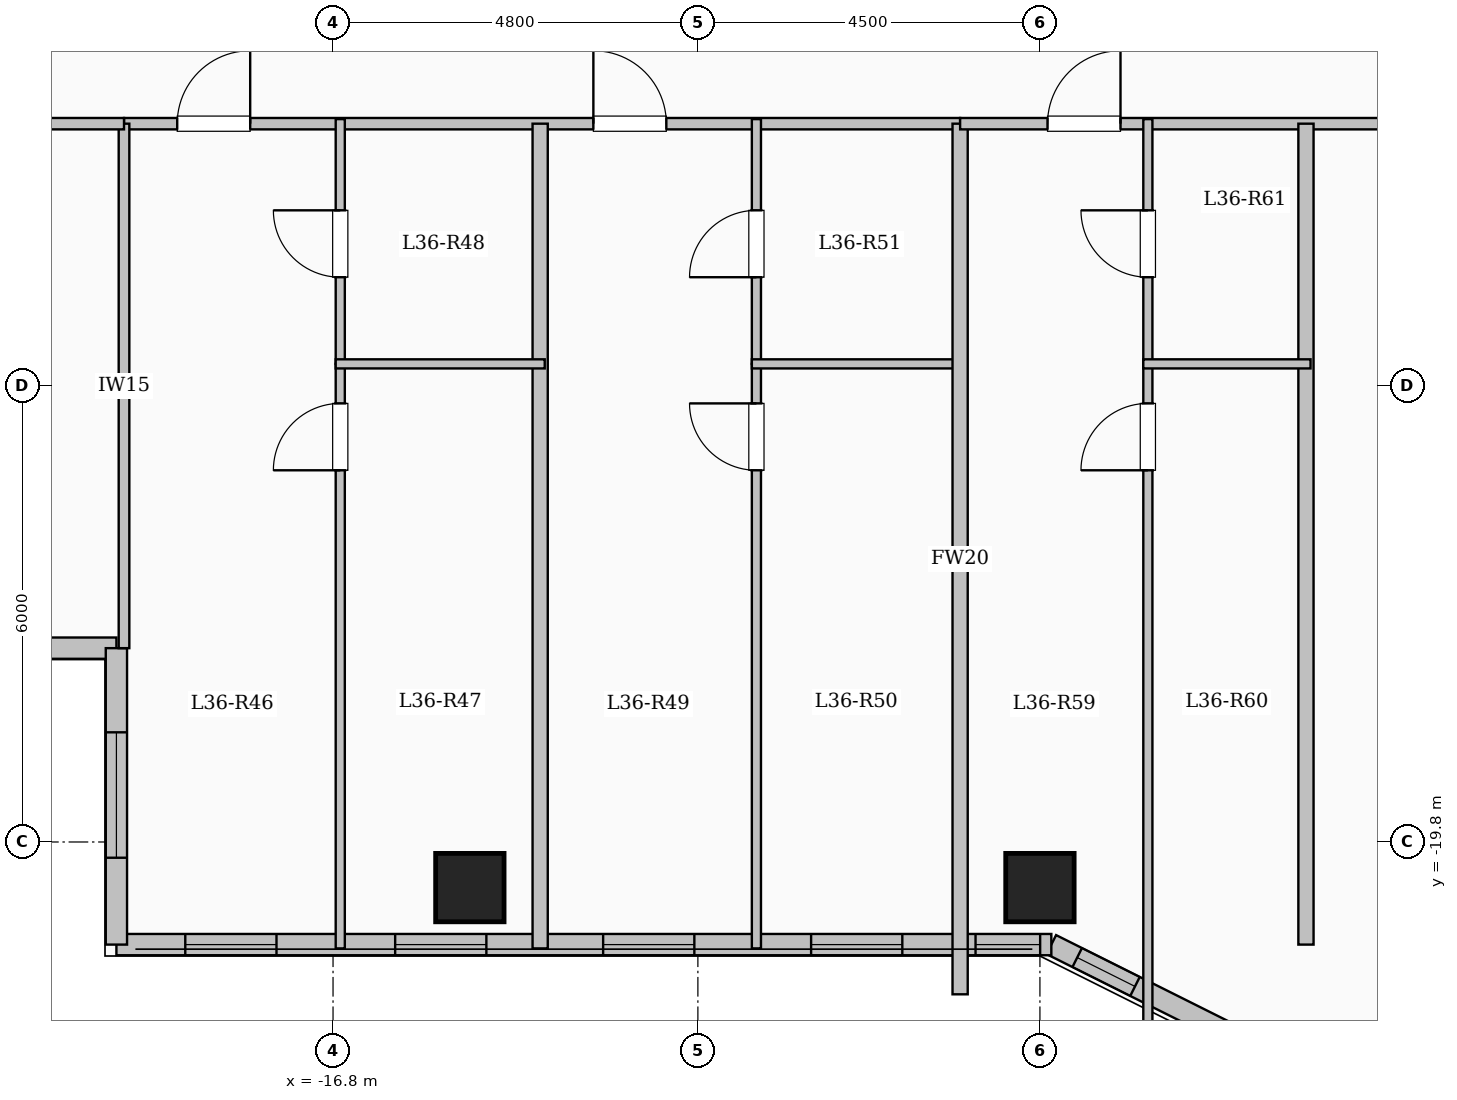
"""IFC4 building model, lengths in metres.
Left out: names, types, materials, properties, quantities, classifications, styles, units other than length and angle.
Written with IfcOpenShell. Run it as: python <this file> out.ifc"""

import sys

from ifc_helpers import new_model, si_unit, direction, frame, frame_2d, origin, origin_2d, place, context, subcontext, project, spatial, rectangle, extrude, element, fill, save


model = new_model("IFC4")
c1 = context("Model", 3, precision=1e-05, world=origin(), true_north=direction((0.0, 1.0)))
c2 = subcontext(c1, "Body", "Model", "MODEL_VIEW")
j1 = project(units=[si_unit("LENGTHUNIT", "METRE"), si_unit("PLANEANGLEUNIT", "RADIAN")], contexts=[c1])
p1 = place(None, origin())
s1 = spatial("IfcSite", under=j1, at=p1, CompositionType="ELEMENT")
p2 = place(p1, origin())
s2 = spatial("IfcBuilding", under=s1, at=p2, CompositionType="ELEMENT")
p3 = place(p2, frame((0.0, 0.0, 135.95)))
s3 = spatial("IfcBuildingStorey", under=s2, at=p3, CompositionType="ELEMENT", Elevation=135.95)
for number, where, z_axis, x_axis in (
    (1, (-15.0, -20.4, 0.0), (0.0, 0.0, 1.0), (1.0, 0.0, 0.0)),
    (2, (-7.5, -20.4, 0.0), (0.0, 0.0, 1.0), (1.0, 0.0, 0.0)),
):
    element("IfcColumn", number, at=place(p3, frame(where, z_axis=z_axis, x_axis=x_axis)), inside=s3, PredefinedType="COLUMN", context=c2, shape_type="SweptSolid", body=[
        extrude(rectangle(XDim=0.9, YDim=0.9, at=origin_2d()), origin(), (0.0, 0.0, 1.0), 3.35),
    ])
p4 = place(p3, frame((-19.65, -17.25, 0.0), z_axis=(0.0, 0.0, 1.0), x_axis=(-1.0, 0.0, 0.0)))
e3 = element("IfcWall", 3, at=p4, inside=s3, PredefinedType="SOLIDWALL", context=c2, shape_type="SweptSolid", body=[
    extrude(rectangle(XDim=5.4, YDim=0.28, at=frame_2d((2.7, 0.0))), origin(), (0.0, 0.0, 1.0), 3.1),
])
p5 = place(p4, frame((1.575, 0.0, 0.9)))
e4 = element("IfcOpeningElement", 4, at=p5, cuts=e3, PredefinedType="OPENING", context=c2, shape_type="SweptSolid", body=[
    extrude(rectangle(XDim=2.2, YDim=1.75, at=frame_2d((1.1, 0.875))), frame((0.0, 0.15, 0.0), z_axis=(0.0, -1.0, 0.0), x_axis=(1.0, 0.0, 0.0)), (0.0, 0.0, 1.0), 0.3),
])
p6 = place(p3, frame((-4.35, -22.65, 0.0), z_axis=(0.0, 0.0, 1.0), x_axis=(-0.894427191, 0.4472135955, 0.0)))
e5 = element("IfcWall", 5, at=p6, inside=s3, PredefinedType="SOLIDWALL", context=c2, shape_type="SweptSolid", body=[
    extrude(rectangle(XDim=3.354, YDim=0.28, at=frame_2d((1.677, 0.0))), origin(), (0.0, 0.0, 1.0), 3.1),
])
p7 = place(p6, frame((2.124, 0.0, 0.95)))
e6 = element("IfcOpeningElement", 6, at=p7, cuts=e5, PredefinedType="OPENING", context=c2, shape_type="SweptSolid", body=[
    extrude(rectangle(XDim=0.85, YDim=1.5, at=frame_2d((0.425, 0.75))), frame((0.0, 0.15, 0.0), z_axis=(0.0, -1.0, 0.0), x_axis=(1.0, 0.0, 0.0)), (0.0, 0.0, 1.0), 0.3),
])
p8 = place(p3, frame((-7.35, -21.15, 0.0), z_axis=(0.0, 0.0, 1.0), x_axis=(-1.0, 0.0, 0.0)))
e7 = element("IfcWall", 7, at=p8, inside=s3, PredefinedType="SOLIDWALL", context=c2, shape_type="SweptSolid", body=[
    extrude(rectangle(XDim=12.3, YDim=0.28, at=frame_2d((6.15, 0.0))), origin(), (0.0, 0.0, 1.0), 3.1),
])
p9 = place(p8, frame((0.147, 0.0, 0.95)))
e8 = element("IfcOpeningElement", 8, at=p9, cuts=e7, PredefinedType="OPENING", context=c2, shape_type="SweptSolid", body=[
    extrude(rectangle(XDim=0.85, YDim=1.5, at=frame_2d((0.425, 0.75))), frame((0.0, 0.15, 0.0), z_axis=(0.0, -1.0, 0.0), x_axis=(1.0, 0.0, 0.0)), (0.0, 0.0, 1.0), 0.3),
])
p10 = place(p8, frame((1.96, 0.0, 0.95)))
e9 = element("IfcOpeningElement", 9, at=p10, cuts=e7, PredefinedType="OPENING", context=c2, shape_type="SweptSolid", body=[
    extrude(rectangle(XDim=1.2, YDim=1.5, at=frame_2d((0.6, 0.75))), frame((0.0, 0.15, 0.0), z_axis=(0.0, -1.0, 0.0), x_axis=(1.0, 0.0, 0.0)), (0.0, 0.0, 1.0), 0.3),
])
p11 = place(p8, frame((4.697, 0.0, 0.95)))
e10 = element("IfcOpeningElement", 10, at=p11, cuts=e7, PredefinedType="OPENING", context=c2, shape_type="SweptSolid", body=[
    extrude(rectangle(XDim=1.2, YDim=1.5, at=frame_2d((0.6, 0.75))), frame((0.0, 0.15, 0.0), z_axis=(0.0, -1.0, 0.0), x_axis=(1.0, 0.0, 0.0)), (0.0, 0.0, 1.0), 0.3),
])
p12 = place(p8, frame((7.433, 0.0, 0.95)))
e11 = element("IfcOpeningElement", 11, at=p12, cuts=e7, PredefinedType="OPENING", context=c2, shape_type="SweptSolid", body=[
    extrude(rectangle(XDim=1.2, YDim=1.5, at=frame_2d((0.6, 0.75))), frame((0.0, 0.15, 0.0), z_axis=(0.0, -1.0, 0.0), x_axis=(1.0, 0.0, 0.0)), (0.0, 0.0, 1.0), 0.3),
])
p13 = place(p8, frame((10.194, 0.0, 0.95)))
e12 = element("IfcOpeningElement", 12, at=p13, cuts=e7, PredefinedType="OPENING", context=c2, shape_type="SweptSolid", body=[
    extrude(rectangle(XDim=1.2, YDim=1.5, at=frame_2d((0.6, 0.75))), frame((0.0, 0.15, 0.0), z_axis=(0.0, -1.0, 0.0), x_axis=(1.0, 0.0, 0.0)), (0.0, 0.0, 1.0), 0.3),
])
p14 = place(p3, frame((-19.65, -21.15, 0.0), z_axis=(0.0, 0.0, 1.0), x_axis=(0.0, 1.0, 0.0)))
e13 = element("IfcWall", 13, at=p14, inside=s3, PredefinedType="SOLIDWALL", context=c2, shape_type="SweptSolid", body=[
    extrude(rectangle(XDim=3.9, YDim=0.28, at=frame_2d((1.95, 0.0))), origin(), (0.0, 0.0, 1.0), 3.1),
])
p15 = place(p14, frame((1.143, 0.0, 0.9)))
e14 = element("IfcOpeningElement", 14, at=p15, cuts=e13, PredefinedType="OPENING", context=c2, shape_type="SweptSolid", body=[
    extrude(rectangle(XDim=1.65, YDim=1.6, at=frame_2d((0.825, 0.8))), frame((0.0, 0.15, 0.0), z_axis=(0.0, -1.0, 0.0), x_axis=(1.0, 0.0, 0.0)), (0.0, 0.0, 1.0), 0.3),
])
p16 = place(p3, frame((-19.55, -10.35, 0.0), z_axis=(0.0, 0.0, 1.0), x_axis=(1.0, 0.0, 0.0)))
e15 = element("IfcWall", 15, at=p16, inside=s3, PredefinedType="PARTITIONING", context=c2, shape_type="SweptSolid", body=[
    extrude(rectangle(XDim=11.0, YDim=0.15, at=frame_2d((5.5, 0.0))), origin(), (0.0, 0.0, 1.0), 3.1),
])
p17 = place(p16, frame((0.7, 0.0, 0.0)))
e16 = element("IfcOpeningElement", 16, at=p17, cuts=e15, PredefinedType="OPENING", context=c2, shape_type="SweptSolid", body=[
    extrude(rectangle(XDim=0.96, YDim=2.15, at=frame_2d((0.48, 1.075))), frame((0.0, 0.085, 0.0), z_axis=(0.0, -1.0, 0.0), x_axis=(1.0, 0.0, 0.0)), (0.0, 0.0, 1.0), 0.17),
])
p18 = place(p16, frame((6.175, 0.0, 0.0)))
e17 = element("IfcOpeningElement", 17, at=p18, cuts=e15, PredefinedType="OPENING", context=c2, shape_type="SweptSolid", body=[
    extrude(rectangle(XDim=0.96, YDim=2.15, at=frame_2d((0.48, 1.075))), frame((0.0, 0.085, 0.0), z_axis=(0.0, -1.0, 0.0), x_axis=(1.0, 0.0, 0.0)), (0.0, 0.0, 1.0), 0.17),
])
p19 = place(p3, frame((-14.075, -21.2, 0.0), z_axis=(0.0, 0.0, 1.0), x_axis=(0.0, 1.0, 0.0)))
e18 = element("IfcWall", 18, at=p19, inside=s3, PredefinedType="SOLIDWALL", context=c2, shape_type="SweptSolid", body=[
    extrude(rectangle(XDim=10.85, YDim=0.2, at=frame_2d((5.425, 0.0))), origin(), (0.0, 0.0, 1.0), 3.1),
])
p20 = place(p3, frame((-16.705, -21.2, 0.0), z_axis=(0.0, 0.0, 1.0), x_axis=(0.0, 1.0, 0.0)))
e19 = element("IfcWall", 19, at=p20, inside=s3, PredefinedType="PARTITIONING", context=c2, shape_type="SweptSolid", body=[
    extrude(rectangle(XDim=7.69, YDim=0.12, at=frame_2d((3.845, 0.0))), origin(), (0.0, 0.0, 1.0), 3.1),
])
p21 = place(p20, frame((6.29, 0.0, 0.0)))
e20 = element("IfcOpeningElement", 20, at=p21, cuts=e19, PredefinedType="OPENING", context=c2, shape_type="SweptSolid", body=[
    extrude(rectangle(XDim=0.88, YDim=2.1, at=frame_2d((0.44, 1.05))), frame((0.0, 0.07, 0.0), z_axis=(0.0, -1.0, 0.0), x_axis=(1.0, 0.0, 0.0)), (0.0, 0.0, 1.0), 0.14),
])
p22 = place(p3, frame((-16.705, -13.51, 0.0), z_axis=(0.0, 0.0, 1.0), x_axis=(0.0, 1.0, 0.0)))
e21 = element("IfcWall", 21, at=p22, inside=s3, PredefinedType="PARTITIONING", context=c2, shape_type="SweptSolid", body=[
    extrude(rectangle(XDim=3.22, YDim=0.12, at=frame_2d((1.61, 0.0))), origin(), (0.0, 0.0, 1.0), 3.1),
])
p23 = place(p22, frame((1.14, 0.0, 0.0)))
e22 = element("IfcOpeningElement", 22, at=p23, cuts=e21, PredefinedType="OPENING", context=c2, shape_type="SweptSolid", body=[
    extrude(rectangle(XDim=0.88, YDim=2.1, at=frame_2d((0.44, 1.05))), frame((0.0, 0.07, 0.0), z_axis=(0.0, -1.0, 0.0), x_axis=(1.0, 0.0, 0.0)), (0.0, 0.0, 1.0), 0.14),
])
p24 = place(p3, frame((-16.765, -13.51, 0.0), z_axis=(0.0, 0.0, 1.0), x_axis=(1.0, 0.0, 0.0)))
e23 = element("IfcWall", 23, at=p24, inside=s3, PredefinedType="PARTITIONING", context=c2, shape_type="SweptSolid", body=[
    extrude(rectangle(XDim=2.75, YDim=0.12, at=frame_2d((1.375, 0.0))), origin(), (0.0, 0.0, 1.0), 3.1),
])
p25 = place(p3, frame((-11.23, -21.2, 0.0), z_axis=(0.0, 0.0, 1.0), x_axis=(0.0, 1.0, 0.0)))
e24 = element("IfcWall", 24, at=p25, inside=s3, PredefinedType="PARTITIONING", context=c2, shape_type="SweptSolid", body=[
    extrude(rectangle(XDim=7.69, YDim=0.12, at=frame_2d((3.845, 0.0))), origin(), (0.0, 0.0, 1.0), 3.1),
])
p26 = place(p25, frame((6.29, 0.0, 0.0)))
e25 = element("IfcOpeningElement", 25, at=p26, cuts=e24, PredefinedType="OPENING", context=c2, shape_type="SweptSolid", body=[
    extrude(rectangle(XDim=0.88, YDim=2.1, at=frame_2d((0.44, 1.05))), frame((0.0, 0.07, 0.0), z_axis=(0.0, -1.0, 0.0), x_axis=(1.0, 0.0, 0.0)), (0.0, 0.0, 1.0), 0.14),
])
p27 = place(p3, frame((-11.23, -13.51, 0.0), z_axis=(0.0, 0.0, 1.0), x_axis=(0.0, 1.0, 0.0)))
e26 = element("IfcWall", 26, at=p27, inside=s3, PredefinedType="PARTITIONING", context=c2, shape_type="SweptSolid", body=[
    extrude(rectangle(XDim=3.22, YDim=0.12, at=frame_2d((1.61, 0.0))), origin(), (0.0, 0.0, 1.0), 3.1),
])
p28 = place(p27, frame((1.14, 0.0, 0.0)))
e27 = element("IfcOpeningElement", 27, at=p28, cuts=e26, PredefinedType="OPENING", context=c2, shape_type="SweptSolid", body=[
    extrude(rectangle(XDim=0.88, YDim=2.1, at=frame_2d((0.44, 1.05))), frame((0.0, 0.07, 0.0), z_axis=(0.0, -1.0, 0.0), x_axis=(1.0, 0.0, 0.0)), (0.0, 0.0, 1.0), 0.14),
])
p29 = place(p3, frame((-11.29, -13.51, 0.0), z_axis=(0.0, 0.0, 1.0), x_axis=(1.0, 0.0, 0.0)))
e28 = element("IfcWall", 28, at=p29, inside=s3, PredefinedType="PARTITIONING", context=c2, shape_type="SweptSolid", body=[
    extrude(rectangle(XDim=2.75, YDim=0.12, at=frame_2d((1.375, 0.0))), origin(), (0.0, 0.0, 1.0), 3.1),
])
p30 = place(p3, frame((-8.55, -21.804, 0.0), z_axis=(0.0, 0.0, 1.0), x_axis=(0.0, 1.0, 0.0)))
e29 = element("IfcWall", 29, at=p30, inside=s3, PredefinedType="SOLIDWALL", context=c2, shape_type="SweptSolid", body=[
    extrude(rectangle(XDim=11.454, YDim=0.2, at=frame_2d((5.727, 0.0))), origin(), (0.0, 0.0, 1.0), 3.1),
])
p31 = place(p3, frame((-8.55, -10.35, 0.0), z_axis=(0.0, 0.0, 1.0), x_axis=(1.0, 0.0, 0.0)))
e30 = element("IfcWall", 30, at=p31, inside=s3, PredefinedType="PARTITIONING", context=c2, shape_type="SweptSolid", body=[
    extrude(rectangle(XDim=17.1, YDim=0.15, at=frame_2d((8.55, 0.0))), origin(), (0.0, 0.0, 1.0), 3.1),
])
p32 = place(p31, frame((1.15, 0.0, 0.0)))
e31 = element("IfcOpeningElement", 31, at=p32, cuts=e30, PredefinedType="OPENING", context=c2, shape_type="SweptSolid", body=[
    extrude(rectangle(XDim=0.96, YDim=2.15, at=frame_2d((0.48, 1.075))), frame((0.0, 0.085, 0.0), z_axis=(0.0, -1.0, 0.0), x_axis=(1.0, 0.0, 0.0)), (0.0, 0.0, 1.0), 0.17),
])
p33 = place(p31, frame((10.5, 0.0, 0.0)))
e32 = element("IfcOpeningElement", 32, at=p33, cuts=e30, PredefinedType="OPENING", context=c2, shape_type="SweptSolid", body=[
    extrude(rectangle(XDim=0.96, YDim=2.15, at=frame_2d((0.48, 1.075))), frame((0.0, 0.085, 0.0), z_axis=(0.0, -1.0, 0.0), x_axis=(1.0, 0.0, 0.0)), (0.0, 0.0, 1.0), 0.17),
])
p34 = place(p3, frame((-4.0, -21.15, 0.0), z_axis=(0.0, 0.0, 1.0), x_axis=(0.0, 1.0, 0.0)))
e33 = element("IfcWall", 33, at=p34, inside=s3, PredefinedType="SOLIDWALL", context=c2, shape_type="SweptSolid", body=[
    extrude(rectangle(XDim=10.8, YDim=0.2, at=frame_2d((5.4, 0.0))), origin(), (0.0, 0.0, 1.0), 3.1),
])
p35 = place(p3, frame((-6.08, -22.414, 0.0), z_axis=(0.0, 0.0, 1.0), x_axis=(0.0, 1.0, 0.0)))
e34 = element("IfcWall", 34, at=p35, inside=s3, PredefinedType="PARTITIONING", context=c2, shape_type="SweptSolid", body=[
    extrude(rectangle(XDim=8.904, YDim=0.12, at=frame_2d((4.452, 0.0))), origin(), (0.0, 0.0, 1.0), 3.1),
])
p36 = place(p35, frame((7.504, 0.0, 0.0)))
e35 = element("IfcOpeningElement", 35, at=p36, cuts=e34, PredefinedType="OPENING", context=c2, shape_type="SweptSolid", body=[
    extrude(rectangle(XDim=0.88, YDim=2.1, at=frame_2d((0.44, 1.05))), frame((0.0, 0.07, 0.0), z_axis=(0.0, -1.0, 0.0), x_axis=(1.0, 0.0, 0.0)), (0.0, 0.0, 1.0), 0.14),
])
p37 = place(p3, frame((-6.08, -13.51, 0.0), z_axis=(0.0, 0.0, 1.0), x_axis=(0.0, 1.0, 0.0)))
e36 = element("IfcWall", 36, at=p37, inside=s3, PredefinedType="PARTITIONING", context=c2, shape_type="SweptSolid", body=[
    extrude(rectangle(XDim=3.22, YDim=0.12, at=frame_2d((1.61, 0.0))), origin(), (0.0, 0.0, 1.0), 3.1),
])
p38 = place(p37, frame((1.14, 0.0, 0.0)))
e37 = element("IfcOpeningElement", 37, at=p38, cuts=e36, PredefinedType="OPENING", context=c2, shape_type="SweptSolid", body=[
    extrude(rectangle(XDim=0.88, YDim=2.1, at=frame_2d((0.44, 1.05))), frame((0.0, 0.07, 0.0), z_axis=(0.0, -1.0, 0.0), x_axis=(1.0, 0.0, 0.0)), (0.0, 0.0, 1.0), 0.14),
])
p39 = place(p3, frame((-6.14, -13.51, 0.0), z_axis=(0.0, 0.0, 1.0), x_axis=(1.0, 0.0, 0.0)))
e38 = element("IfcWall", 38, at=p39, inside=s3, PredefinedType="PARTITIONING", context=c2, shape_type="SweptSolid", body=[
    extrude(rectangle(XDim=2.2, YDim=0.12, at=frame_2d((1.1, 0.0))), origin(), (0.0, 0.0, 1.0), 3.1),
])
p40 = place(p3, frame((-19.55, -17.25, 0.0), z_axis=(0.0, 0.0, 1.0), x_axis=(0.0, 1.0, 0.0)))
e39 = element("IfcWall", 39, at=p40, inside=s3, PredefinedType="PARTITIONING", context=c2, shape_type="SweptSolid", body=[
    extrude(rectangle(XDim=6.9, YDim=0.14, at=frame_2d((3.45, 0.0))), origin(), (0.0, 0.0, 1.0), 3.1),
])
p41 = place(p3, frame((-25.08, -10.35, 0.0), z_axis=(0.0, 0.0, 1.0), x_axis=(1.0, 0.0, 0.0)))
e40 = element("IfcWall", 40, at=p41, inside=s3, PredefinedType="PARTITIONING", context=c2, shape_type="SweptSolid", body=[
    extrude(rectangle(XDim=5.53, YDim=0.15, at=frame_2d((2.765, 0.0))), origin(), (0.0, 0.0, 1.0), 3.1),
])
p42 = place(p41, frame((2.29, 0.0, 0.0)))
e41 = element("IfcOpeningElement", 41, at=p42, cuts=e40, PredefinedType="OPENING", context=c2, shape_type="SweptSolid", body=[
    extrude(rectangle(XDim=0.95, YDim=2.15, at=frame_2d((0.475, 1.075))), frame((0.0, 0.085, 0.0), z_axis=(0.0, -1.0, 0.0), x_axis=(1.0, 0.0, 0.0)), (0.0, 0.0, 1.0), 0.17),
])
p43 = place(p7, origin())
e42 = element("IfcWindow", 42, at=p43, inside=s3, PartitioningType="SINGLE_PANEL", PredefinedType="WINDOW", context=c2, shape_type="SweptSolid", body=[
    extrude(rectangle(XDim=0.85, YDim=1.5, at=frame_2d((0.425, 0.75))), frame((0.0, 0.03, 0.0), z_axis=(0.0, -1.0, 0.0), x_axis=(1.0, 0.0, 0.0)), (0.0, 0.0, 1.0), 0.06),
])
fill(e6, e42)
p44 = place(p9, origin())
e43 = element("IfcWindow", 43, at=p44, inside=s3, PartitioningType="SINGLE_PANEL", PredefinedType="WINDOW", context=c2, shape_type="SweptSolid", body=[
    extrude(rectangle(XDim=0.85, YDim=1.5, at=frame_2d((0.425, 0.75))), frame((0.0, 0.03, 0.0), z_axis=(0.0, -1.0, 0.0), x_axis=(1.0, 0.0, 0.0)), (0.0, 0.0, 1.0), 0.06),
])
fill(e8, e43)
p45 = place(p10, origin())
e44 = element("IfcWindow", 44, at=p45, inside=s3, PartitioningType="SINGLE_PANEL", PredefinedType="WINDOW", context=c2, shape_type="SweptSolid", body=[
    extrude(rectangle(XDim=1.2, YDim=1.5, at=frame_2d((0.6, 0.75))), frame((0.0, 0.03, 0.0), z_axis=(0.0, -1.0, 0.0), x_axis=(1.0, 0.0, 0.0)), (0.0, 0.0, 1.0), 0.06),
])
fill(e9, e44)
p46 = place(p11, origin())
e45 = element("IfcWindow", 45, at=p46, inside=s3, PartitioningType="SINGLE_PANEL", PredefinedType="WINDOW", context=c2, shape_type="SweptSolid", body=[
    extrude(rectangle(XDim=1.2, YDim=1.5, at=frame_2d((0.6, 0.75))), frame((0.0, 0.03, 0.0), z_axis=(0.0, -1.0, 0.0), x_axis=(1.0, 0.0, 0.0)), (0.0, 0.0, 1.0), 0.06),
])
fill(e10, e45)
p47 = place(p12, origin())
e46 = element("IfcWindow", 46, at=p47, inside=s3, PartitioningType="SINGLE_PANEL", PredefinedType="WINDOW", context=c2, shape_type="SweptSolid", body=[
    extrude(rectangle(XDim=1.2, YDim=1.5, at=frame_2d((0.6, 0.75))), frame((0.0, 0.03, 0.0), z_axis=(0.0, -1.0, 0.0), x_axis=(1.0, 0.0, 0.0)), (0.0, 0.0, 1.0), 0.06),
])
fill(e11, e46)
p48 = place(p13, origin())
e47 = element("IfcWindow", 47, at=p48, inside=s3, PartitioningType="SINGLE_PANEL", PredefinedType="WINDOW", context=c2, shape_type="SweptSolid", body=[
    extrude(rectangle(XDim=1.2, YDim=1.5, at=frame_2d((0.6, 0.75))), frame((0.0, 0.03, 0.0), z_axis=(0.0, -1.0, 0.0), x_axis=(1.0, 0.0, 0.0)), (0.0, 0.0, 1.0), 0.06),
])
fill(e12, e47)
p49 = place(p15, origin())
e48 = element("IfcWindow", 48, at=p49, inside=s3, PartitioningType="SINGLE_PANEL", PredefinedType="WINDOW", context=c2, shape_type="SweptSolid", body=[
    extrude(rectangle(XDim=1.65, YDim=1.6, at=frame_2d((0.825, 0.8))), frame((0.0, 0.03, 0.0), z_axis=(0.0, -1.0, 0.0), x_axis=(1.0, 0.0, 0.0)), (0.0, 0.0, 1.0), 0.06),
])
fill(e14, e48)
p50 = place(p17, origin())
e49 = element("IfcDoor", 49, at=p50, inside=s3, OperationType="SINGLE_SWING_RIGHT", PredefinedType="DOOR", context=c2, shape_type="SweptSolid", body=[
    extrude(rectangle(XDim=0.96, YDim=2.15, at=frame_2d((0.48, 1.075))), frame((0.0, 0.025, 0.0), z_axis=(0.0, -1.0, 0.0), x_axis=(1.0, 0.0, 0.0)), (0.0, 0.0, 1.0), 0.05),
])
fill(e16, e49)
p51 = place(p21, origin())
e50 = element("IfcDoor", 50, at=p51, inside=s3, OperationType="SINGLE_SWING_LEFT", PredefinedType="DOOR", context=c2, shape_type="SweptSolid", body=[
    extrude(rectangle(XDim=0.88, YDim=2.1, at=frame_2d((0.44, 1.05))), frame((0.0, 0.025, 0.0), z_axis=(0.0, -1.0, 0.0), x_axis=(1.0, 0.0, 0.0)), (0.0, 0.0, 1.0), 0.05),
])
fill(e20, e50)
p52 = place(p23, origin())
e51 = element("IfcDoor", 51, at=p52, inside=s3, OperationType="SINGLE_SWING_RIGHT", PredefinedType="DOOR", context=c2, shape_type="SweptSolid", body=[
    extrude(rectangle(XDim=0.88, YDim=2.1, at=frame_2d((0.44, 1.05))), frame((0.0, 0.025, 0.0), z_axis=(0.0, -1.0, 0.0), x_axis=(1.0, 0.0, 0.0)), (0.0, 0.0, 1.0), 0.05),
])
fill(e22, e51)
p53 = place(p18, origin())
e52 = element("IfcDoor", 52, at=p53, inside=s3, OperationType="SINGLE_SWING_LEFT", PredefinedType="DOOR", context=c2, shape_type="SweptSolid", body=[
    extrude(rectangle(XDim=0.96, YDim=2.15, at=frame_2d((0.48, 1.075))), frame((0.0, 0.025, 0.0), z_axis=(0.0, -1.0, 0.0), x_axis=(1.0, 0.0, 0.0)), (0.0, 0.0, 1.0), 0.05),
])
fill(e17, e52)
p54 = place(p26, origin())
e53 = element("IfcDoor", 53, at=p54, inside=s3, OperationType="SINGLE_SWING_RIGHT", PredefinedType="DOOR", context=c2, shape_type="SweptSolid", body=[
    extrude(rectangle(XDim=0.88, YDim=2.1, at=frame_2d((0.44, 1.05))), frame((0.0, 0.025, 0.0), z_axis=(0.0, -1.0, 0.0), x_axis=(1.0, 0.0, 0.0)), (0.0, 0.0, 1.0), 0.05),
])
fill(e25, e53)
p55 = place(p28, origin())
e54 = element("IfcDoor", 54, at=p55, inside=s3, OperationType="SINGLE_SWING_LEFT", PredefinedType="DOOR", context=c2, shape_type="SweptSolid", body=[
    extrude(rectangle(XDim=0.88, YDim=2.1, at=frame_2d((0.44, 1.05))), frame((0.0, 0.025, 0.0), z_axis=(0.0, -1.0, 0.0), x_axis=(1.0, 0.0, 0.0)), (0.0, 0.0, 1.0), 0.05),
])
fill(e27, e54)
p56 = place(p32, origin())
e55 = element("IfcDoor", 55, at=p56, inside=s3, OperationType="SINGLE_SWING_RIGHT", PredefinedType="DOOR", context=c2, shape_type="SweptSolid", body=[
    extrude(rectangle(XDim=0.96, YDim=2.15, at=frame_2d((0.48, 1.075))), frame((0.0, 0.025, 0.0), z_axis=(0.0, -1.0, 0.0), x_axis=(1.0, 0.0, 0.0)), (0.0, 0.0, 1.0), 0.05),
])
fill(e31, e55)
p57 = place(p36, origin())
e56 = element("IfcDoor", 56, at=p57, inside=s3, OperationType="SINGLE_SWING_LEFT", PredefinedType="DOOR", context=c2, shape_type="SweptSolid", body=[
    extrude(rectangle(XDim=0.88, YDim=2.1, at=frame_2d((0.44, 1.05))), frame((0.0, 0.025, 0.0), z_axis=(0.0, -1.0, 0.0), x_axis=(1.0, 0.0, 0.0)), (0.0, 0.0, 1.0), 0.05),
])
fill(e35, e56)
p58 = place(p38, origin())
e57 = element("IfcDoor", 57, at=p58, inside=s3, OperationType="SINGLE_SWING_RIGHT", PredefinedType="DOOR", context=c2, shape_type="SweptSolid", body=[
    extrude(rectangle(XDim=0.88, YDim=2.1, at=frame_2d((0.44, 1.05))), frame((0.0, 0.025, 0.0), z_axis=(0.0, -1.0, 0.0), x_axis=(1.0, 0.0, 0.0)), (0.0, 0.0, 1.0), 0.05),
])
fill(e37, e57)
save(model, sys.argv[1])
